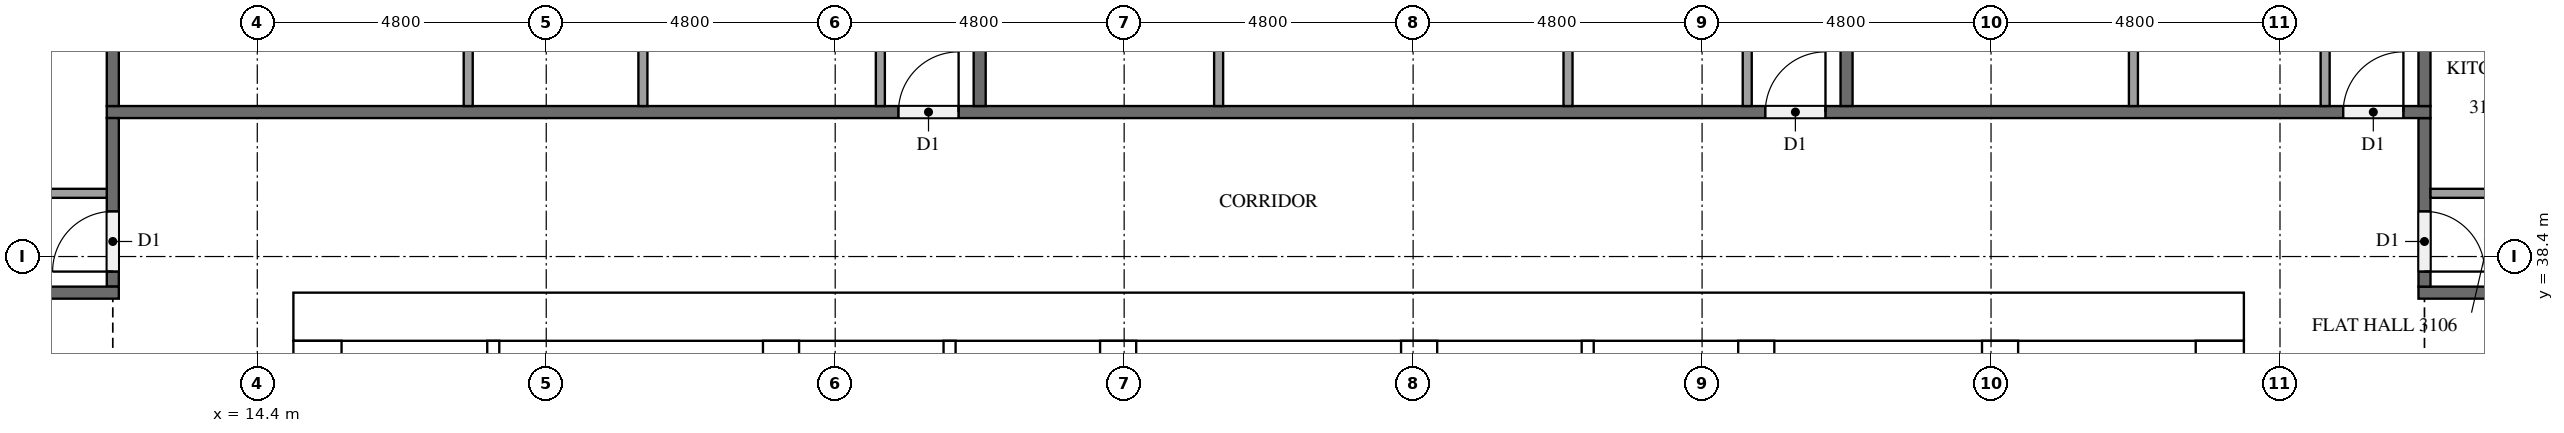
"""IFC4 building model, lengths in metres.
Left out: names, types, materials, properties, quantities, classifications, styles, units other than length and angle.
Written with IfcOpenShell. Run it as: python <this file> out.ifc"""

import sys

from ifc_helpers import new_model, si_unit, direction, frame, frame_2d, origin, place, context, subcontext, project, spatial, rectangle, extrude, element, fill, save


model = new_model("IFC4")
c1 = context("Model", 3, precision=1e-05, world=origin(), true_north=direction((0.0, 1.0)))
c2 = subcontext(c1, "Body", "Model", "MODEL_VIEW")
j1 = project(units=[si_unit("LENGTHUNIT", "METRE"), si_unit("PLANEANGLEUNIT", "RADIAN")], contexts=[c1])
p1 = place(None, origin())
s1 = spatial("IfcSite", under=j1, at=p1, CompositionType="ELEMENT")
p2 = place(p1, origin())
s2 = spatial("IfcBuilding", under=s1, at=p2, CompositionType="ELEMENT")
p3 = place(p2, frame((0.0, 0.0, 122.6)))
s3 = spatial("IfcBuildingStorey", under=s2, at=p3, CompositionType="ELEMENT", Elevation=122.6)
p4 = place(p3, frame((15.0, 37.4, 0.0), z_axis=(0.0, 0.0, 1.0), x_axis=(1.0, 0.0, 0.0)))
e1 = element("IfcWall", 1, at=p4, inside=s3, PredefinedType="SHEAR", context=c2, shape_type="SweptSolid", body=[
    extrude(rectangle(XDim=32.4, YDim=0.8, at=frame_2d((16.2, 0.0))), origin(), (0.0, 0.0, 1.0), 3.2),
])
p5 = place(p4, frame((15.3, 0.0, 0.0)))
e2 = element("IfcOpeningElement", 2, at=p5, cuts=e1, PredefinedType="OPENING", context=c2, shape_type="SweptSolid", body=[
    extrude(rectangle(XDim=1.8, YDim=2.1, at=frame_2d((0.9, 1.05))), frame((0.0, 0.41, 0.0), z_axis=(0.0, -1.0, 0.0), x_axis=(1.0, 0.0, 0.0)), (0.0, 0.0, 1.0), 0.82),
])
p6 = place(p4, frame((1.51, 0.0, 0.0)))
e3 = element("IfcOpeningElement", 3, at=p6, cuts=e1, PredefinedType="OPENING", context=c2, shape_type="SweptSolid", body=[
    extrude(rectangle(XDim=1.0, YDim=2.1, at=frame_2d((0.5, 1.05))), frame((0.0, 0.41, 0.0), z_axis=(0.0, -1.0, 0.0), x_axis=(1.0, 0.0, 0.0)), (0.0, 0.0, 1.0), 0.82),
])
p7 = place(p4, frame((5.11, 0.0, 0.0)))
e4 = element("IfcOpeningElement", 4, at=p7, cuts=e1, PredefinedType="OPENING", context=c2, shape_type="SweptSolid", body=[
    extrude(rectangle(XDim=1.0, YDim=2.1, at=frame_2d((0.5, 1.05))), frame((0.0, 0.41, 0.0), z_axis=(0.0, -1.0, 0.0), x_axis=(1.0, 0.0, 0.0)), (0.0, 0.0, 1.0), 0.82),
])
p8 = place(p3, frame((15.4, 15.8, 0.0), z_axis=(0.0, 0.0, 1.0), x_axis=(0.0, 1.0, 0.0)))
e5 = element("IfcWall", 5, at=p8, inside=s3, PredefinedType="SHEAR", context=c2, shape_type="SweptSolid", body=[
    extrude(rectangle(XDim=21.2, YDim=0.8, at=frame_2d((10.6, 0.0))), origin(), (0.0, 0.0, 1.0), 3.2),
])
p9 = place(p8, frame((4.96, 0.0, 0.0)))
e6 = element("IfcOpeningElement", 6, at=p9, cuts=e5, PredefinedType="OPENING", context=c2, shape_type="SweptSolid", body=[
    extrude(rectangle(XDim=1.2, YDim=2.1, at=frame_2d((0.6, 1.05))), frame((0.0, 0.41, 0.0), z_axis=(0.0, -1.0, 0.0), x_axis=(1.0, 0.0, 0.0)), (0.0, 0.0, 1.0), 0.82),
])
p10 = place(p3, frame((47.0, 15.8, 0.0), z_axis=(0.0, 0.0, 1.0), x_axis=(0.0, 1.0, 0.0)))
e7 = element("IfcWall", 7, at=p10, inside=s3, PredefinedType="SHEAR", context=c2, shape_type="SweptSolid", body=[
    extrude(rectangle(XDim=21.2, YDim=0.8, at=frame_2d((10.6, 0.0))), origin(), (0.0, 0.0, 1.0), 3.2),
])
p11 = place(p10, frame((10.3, 0.0, 0.0)))
e8 = element("IfcOpeningElement", 8, at=p11, cuts=e7, PredefinedType="OPENING", context=c2, shape_type="SweptSolid", body=[
    extrude(rectangle(XDim=1.2, YDim=2.1, at=frame_2d((0.6, 1.05))), frame((0.0, 0.41, 0.0), z_axis=(0.0, -1.0, 0.0), x_axis=(1.0, 0.0, 0.0)), (0.0, 0.0, 1.0), 0.82),
])
p12 = place(p3, frame((23.1, 15.8, 0.0), z_axis=(0.0, 0.0, 1.0), x_axis=(0.0, 1.0, 0.0)))
e9 = element("IfcWall", 9, at=p12, inside=s3, PredefinedType="SHEAR", context=c2, shape_type="SweptSolid", body=[
    extrude(rectangle(XDim=21.2, YDim=0.6, at=frame_2d((10.6, 0.0))), origin(), (0.0, 0.0, 1.0), 3.2),
])
p13 = place(p3, frame((39.3, 27.75, 0.0), z_axis=(0.0, 0.0, 1.0), x_axis=(0.0, 1.0, 0.0)))
e10 = element("IfcWall", 10, at=p13, inside=s3, PredefinedType="SHEAR", context=c2, shape_type="SweptSolid", body=[
    extrude(rectangle(XDim=9.25, YDim=0.6, at=frame_2d((4.625, 0.0))), origin(), (0.0, 0.0, 1.0), 3.2),
])
p14 = place(p3, frame((43.35, 27.75, 0.0), z_axis=(0.0, 0.0, 1.0), x_axis=(0.0, 1.0, 0.0)))
e11 = element("IfcWall", 11, at=p14, inside=s3, PredefinedType="SHEAR", context=c2, shape_type="SweptSolid", body=[
    extrude(rectangle(XDim=9.25, YDim=0.6, at=frame_2d((4.625, 0.0))), origin(), (0.0, 0.0, 1.0), 3.2),
])
p15 = place(p14, frame((7.65, 0.0, 0.0)))
e12 = element("IfcOpeningElement", 12, at=p15, cuts=e11, PredefinedType="OPENING", context=c2, shape_type="SweptSolid", body=[
    extrude(rectangle(XDim=1.2, YDim=2.1, at=frame_2d((0.6, 1.05))), frame((0.0, 0.31, 0.0), z_axis=(0.0, -1.0, 0.0), x_axis=(1.0, 0.0, 0.0)), (0.0, 0.0, 1.0), 0.62),
])
for number, where, z_axis, x_axis in (
    (13, (28.7, 33.85, 0.0), (0.0, 0.0, 1.0), (0.0, 1.0, 0.0)),
    (14, (33.7, 33.85, 0.0), (0.0, 0.0, 1.0), (0.0, 1.0, 0.0)),
):
    element("IfcWall", number, at=place(p3, frame(where, z_axis=z_axis, x_axis=x_axis)), inside=s3, PredefinedType="SHEAR", context=c2, shape_type="SweptSolid", body=[
        extrude(rectangle(XDim=3.15, YDim=0.6, at=frame_2d((1.575, 0.0))), origin(), (0.0, 0.0, 1.0), 3.2),
    ])
for number, where, z_axis, x_axis in (
    (15, (25.9, 33.85, 0.0), (0.0, 0.0, 1.0), (0.0, 1.0, 0.0)),
    (16, (36.5, 33.85, 0.0), (0.0, 0.0, 1.0), (0.0, 1.0, 0.0)),
):
    element("IfcWall", number, at=place(p3, frame(where, z_axis=z_axis, x_axis=x_axis)), inside=s3, PredefinedType="SOLIDWALL", context=c2, shape_type="SweptSolid", body=[
        extrude(rectangle(XDim=3.15, YDim=0.2, at=frame_2d((1.575, 0.0))), origin(), (0.0, 0.0, 1.0), 3.2),
    ])
p16 = place(p3, frame((18.32, 31.55, 0.0), z_axis=(0.0, 0.0, 1.0), x_axis=(0.0, 1.0, 0.0)))
e17 = element("IfcWall", 17, at=p16, inside=s3, PredefinedType="PARTITIONING", context=c2, shape_type="SweptSolid", body=[
    extrude(rectangle(XDim=5.45, YDim=0.2, at=frame_2d((2.725, 0.0))), origin(), (0.0, 0.0, 1.0), 3.2),
])
p17 = place(p3, frame((52.5, 37.8, 0.0), z_axis=(0.0, 0.0, 1.0), x_axis=(-1.0, 0.0, 0.0)))
e18 = element("IfcWall", 18, at=p17, inside=s3, PredefinedType="PARTITIONING", context=c2, shape_type="SweptSolid", body=[
    extrude(rectangle(XDim=2.2, YDim=0.2, at=frame_2d((1.1, 0.0))), origin(), (0.0, 0.0, 1.0), 3.2),
])
p18 = place(p3, frame((50.4, 40.7, 0.0), z_axis=(0.0, 0.0, 1.0), x_axis=(0.0, -1.0, 0.0)))
e19 = element("IfcWall", 19, at=p18, inside=s3, PredefinedType="PARTITIONING", context=c2, shape_type="SweptSolid", body=[
    extrude(rectangle(XDim=2.8, YDim=0.2, at=frame_2d((1.4, 0.0))), origin(), (0.0, 0.0, 1.0), 3.2),
])
p19 = place(p18, frame((1.55, 0.0, 0.0)))
e20 = element("IfcOpeningElement", 20, at=p19, cuts=e19, PredefinedType="OPENING", context=c2, shape_type="SweptSolid", body=[
    extrude(rectangle(XDim=1.0, YDim=2.1, at=frame_2d((0.5, 1.05))), frame((0.0, 0.11, 0.0), z_axis=(0.0, -1.0, 0.0), x_axis=(1.0, 0.0, 0.0)), (0.0, 0.0, 1.0), 0.22),
])
p20 = place(p3, frame((11.9, 40.8, 0.0), z_axis=(0.0, 0.0, 1.0), x_axis=(1.0, 0.0, 0.0)))
e21 = element("IfcWall", 21, at=p20, inside=s3, PredefinedType="PARTITIONING", context=c2, shape_type="SweptSolid", body=[
    extrude(rectangle(XDim=38.6, YDim=0.2, at=frame_2d((19.3, 0.0))), origin(), (0.0, 0.0, 1.0), 3.2),
])
p21 = place(p20, frame((37.15, 0.0, 0.0)))
e22 = element("IfcOpeningElement", 22, at=p21, cuts=e21, PredefinedType="OPENING", context=c2, shape_type="SweptSolid", body=[
    extrude(rectangle(XDim=1.0, YDim=2.1, at=frame_2d((0.5, 1.05))), frame((0.0, 0.11, 0.0), z_axis=(0.0, -1.0, 0.0), x_axis=(1.0, 0.0, 0.0)), (0.0, 0.0, 1.0), 0.22),
])
p22 = place(p20, frame((27.55, 0.0, 0.0)))
e23 = element("IfcOpeningElement", 23, at=p22, cuts=e21, PredefinedType="OPENING", context=c2, shape_type="SweptSolid", body=[
    extrude(rectangle(XDim=1.0, YDim=2.1, at=frame_2d((0.5, 1.05))), frame((0.0, 0.11, 0.0), z_axis=(0.0, -1.0, 0.0), x_axis=(1.0, 0.0, 0.0)), (0.0, 0.0, 1.0), 0.22),
])
p23 = place(p20, frame((13.15, 0.0, 0.0)))
e24 = element("IfcOpeningElement", 24, at=p23, cuts=e21, PredefinedType="OPENING", context=c2, shape_type="SweptSolid", body=[
    extrude(rectangle(XDim=1.0, YDim=2.1, at=frame_2d((0.5, 1.05))), frame((0.0, 0.11, 0.0), z_axis=(0.0, -1.0, 0.0), x_axis=(1.0, 0.0, 0.0)), (0.0, 0.0, 1.0), 0.22),
])
p24 = place(p3, frame((12.0, 37.9, 0.0), z_axis=(0.0, 0.0, 1.0), x_axis=(0.0, 1.0, 0.0)))
e25 = element("IfcWall", 25, at=p24, inside=s3, PredefinedType="PARTITIONING", context=c2, shape_type="SweptSolid", body=[
    extrude(rectangle(XDim=2.8, YDim=0.2, at=frame_2d((1.4, 0.0))), origin(), (0.0, 0.0, 1.0), 3.2),
])
p25 = place(p24, frame((0.25, 0.0, 0.0)))
e26 = element("IfcOpeningElement", 26, at=p25, cuts=e25, PredefinedType="OPENING", context=c2, shape_type="SweptSolid", body=[
    extrude(rectangle(XDim=1.0, YDim=2.1, at=frame_2d((0.5, 1.05))), frame((0.0, 0.11, 0.0), z_axis=(0.0, -1.0, 0.0), x_axis=(1.0, 0.0, 0.0)), (0.0, 0.0, 1.0), 0.22),
])
p26 = place(p3, frame((12.1, 37.8, 0.0), z_axis=(0.0, 0.0, 1.0), x_axis=(-1.0, 0.0, 0.0)))
e27 = element("IfcWall", 27, at=p26, inside=s3, PredefinedType="PARTITIONING", context=c2, shape_type="SweptSolid", body=[
    extrude(rectangle(XDim=2.2, YDim=0.2, at=frame_2d((1.1, 0.0))), origin(), (0.0, 0.0, 1.0), 3.2),
])
for number, where, z_axis, x_axis in (
    (28, (50.4, 40.9, 0.0), (0.0, 0.0, 1.0), (0.0, 1.0, 0.0)),
    (29, (40.8, 52.7, 0.0), (0.0, 0.0, 1.0), (0.0, -1.0, 0.0)),
    (30, (26.4, 52.7, 0.0), (0.0, 0.0, 1.0), (0.0, -1.0, 0.0)),
    (31, (12.0, 52.7, 0.0), (0.0, 0.0, 1.0), (0.0, -1.0, 0.0)),
):
    element("IfcWall", number, at=place(p3, frame(where, z_axis=z_axis, x_axis=x_axis)), inside=s3, PredefinedType="PARTITIONING", context=c2, shape_type="SweptSolid", body=[
        extrude(rectangle(XDim=11.8, YDim=0.2, at=frame_2d((5.9, 0.0))), origin(), (0.0, 0.0, 1.0), 3.2),
    ])
p27 = place(p3, frame((50.5, 39.45, 0.0), z_axis=(0.0, 0.0, 1.0), x_axis=(1.0, 0.0, 0.0)))
e32 = element("IfcWall", 32, at=p27, inside=s3, PredefinedType="PARTITIONING", context=c2, shape_type="SweptSolid", body=[
    extrude(rectangle(XDim=2.075, YDim=0.15, at=frame_2d((1.038, 0.0))), origin(), (0.0, 0.0, 1.0), 3.2),
])
p28 = place(p3, frame((45.565, 40.9, 0.0), z_axis=(0.0, 0.0, 1.0), x_axis=(0.0, 1.0, 0.0)))
e33 = element("IfcWall", 33, at=p28, inside=s3, PredefinedType="PARTITIONING", context=c2, shape_type="SweptSolid", body=[
    extrude(rectangle(XDim=3.725, YDim=0.15, at=frame_2d((1.863, 0.0))), origin(), (0.0, 0.0, 1.0), 3.2),
])
for number, where, z_axis, x_axis in (
    (34, (48.75, 40.9, 0.0), (0.0, 0.0, 1.0), (0.0, 1.0, 0.0)),
    (35, (36.173, 40.9, 0.0), (0.0, 0.0, 1.0), (0.0, 1.0, 0.0)),
    (36, (30.369, 40.9, 0.0), (0.0, 0.0, 1.0), (0.0, 1.0, 0.0)),
):
    element("IfcWall", number, at=place(p3, frame(where, z_axis=z_axis, x_axis=x_axis)), inside=s3, PredefinedType="PARTITIONING", context=c2, shape_type="SweptSolid", body=[
        extrude(rectangle(XDim=3.875, YDim=0.15, at=frame_2d((1.938, 0.0))), origin(), (0.0, 0.0, 1.0), 3.2),
    ])
p29 = place(p3, frame((39.15, 40.9, 0.0), z_axis=(0.0, 0.0, 1.0), x_axis=(0.0, 1.0, 0.0)))
e37 = element("IfcWall", 37, at=p29, inside=s3, PredefinedType="PARTITIONING", context=c2, shape_type="SweptSolid", body=[
    extrude(rectangle(XDim=4.025, YDim=0.15, at=frame_2d((2.013, 0.0))), origin(), (0.0, 0.0, 1.0), 3.2),
])
for number, where, z_axis, x_axis in (
    (38, (20.806, 40.9, 0.0), (0.0, 0.0, 1.0), (0.0, 1.0, 0.0)),
    (39, (17.904, 40.9, 0.0), (0.0, 0.0, 1.0), (0.0, 1.0, 0.0)),
):
    element("IfcWall", number, at=place(p3, frame(where, z_axis=z_axis, x_axis=x_axis)), inside=s3, PredefinedType="PARTITIONING", context=c2, shape_type="SweptSolid", body=[
        extrude(rectangle(XDim=4.475, YDim=0.15, at=frame_2d((2.238, 0.0))), origin(), (0.0, 0.0, 1.0), 3.2),
    ])
p30 = place(p3, frame((24.75, 40.9, 0.0), z_axis=(0.0, 0.0, 1.0), x_axis=(0.0, 1.0, 0.0)))
e40 = element("IfcWall", 40, at=p30, inside=s3, PredefinedType="PARTITIONING", context=c2, shape_type="SweptSolid", body=[
    extrude(rectangle(XDim=4.625, YDim=0.15, at=frame_2d((2.312, 0.0))), origin(), (0.0, 0.0, 1.0), 3.2),
])
p31 = place(p3, frame((11.9, 39.45, 0.0), z_axis=(0.0, 0.0, 1.0), x_axis=(-1.0, 0.0, 0.0)))
e41 = element("IfcWall", 41, at=p31, inside=s3, PredefinedType="PARTITIONING", context=c2, shape_type="SweptSolid", body=[
    extrude(rectangle(XDim=4.325, YDim=0.15, at=frame_2d((2.163, 0.0))), origin(), (0.0, 0.0, 1.0), 3.2),
])
p32 = place(p5, origin())
e42 = element("IfcDoor", 42, at=p32, inside=s3, OperationType="DOUBLE_DOOR_SINGLE_SWING", PredefinedType="DOOR", context=c2, shape_type="SweptSolid", body=[
    extrude(rectangle(XDim=1.8, YDim=2.1, at=frame_2d((0.9, 1.05))), frame((0.0, 0.025, 0.0), z_axis=(0.0, -1.0, 0.0), x_axis=(1.0, 0.0, 0.0)), (0.0, 0.0, 1.0), 0.05),
])
fill(e2, e42)
p33 = place(p6, origin())
e43 = element("IfcDoor", 43, at=p33, inside=s3, OperationType="SINGLE_SWING_RIGHT", PredefinedType="DOOR", context=c2, shape_type="SweptSolid", body=[
    extrude(rectangle(XDim=1.0, YDim=2.1, at=frame_2d((0.5, 1.05))), frame((0.0, 0.025, 0.0), z_axis=(0.0, -1.0, 0.0), x_axis=(1.0, 0.0, 0.0)), (0.0, 0.0, 1.0), 0.05),
])
fill(e3, e43)
p34 = place(p7, origin())
e44 = element("IfcDoor", 44, at=p34, inside=s3, OperationType="SINGLE_SWING_LEFT", PredefinedType="DOOR", context=c2, shape_type="SweptSolid", body=[
    extrude(rectangle(XDim=1.0, YDim=2.1, at=frame_2d((0.5, 1.05))), frame((0.0, 0.025, 0.0), z_axis=(0.0, -1.0, 0.0), x_axis=(1.0, 0.0, 0.0)), (0.0, 0.0, 1.0), 0.05),
])
fill(e4, e44)
p35 = place(p19, origin())
e45 = element("IfcDoor", 45, at=p35, inside=s3, OperationType="SINGLE_SWING_RIGHT", PredefinedType="DOOR", context=c2, shape_type="SweptSolid", body=[
    extrude(rectangle(XDim=1.0, YDim=2.1, at=frame_2d((0.5, 1.05))), frame((0.0, 0.025, 0.0), z_axis=(0.0, -1.0, 0.0), x_axis=(1.0, 0.0, 0.0)), (0.0, 0.0, 1.0), 0.05),
])
fill(e20, e45)
p36 = place(p21, origin())
e46 = element("IfcDoor", 46, at=p36, inside=s3, OperationType="SINGLE_SWING_RIGHT", PredefinedType="DOOR", context=c2, shape_type="SweptSolid", body=[
    extrude(rectangle(XDim=1.0, YDim=2.1, at=frame_2d((0.5, 1.05))), frame((0.0, 0.025, 0.0), z_axis=(0.0, -1.0, 0.0), x_axis=(1.0, 0.0, 0.0)), (0.0, 0.0, 1.0), 0.05),
])
fill(e22, e46)
p37 = place(p22, origin())
e47 = element("IfcDoor", 47, at=p37, inside=s3, OperationType="SINGLE_SWING_RIGHT", PredefinedType="DOOR", context=c2, shape_type="SweptSolid", body=[
    extrude(rectangle(XDim=1.0, YDim=2.1, at=frame_2d((0.5, 1.05))), frame((0.0, 0.025, 0.0), z_axis=(0.0, -1.0, 0.0), x_axis=(1.0, 0.0, 0.0)), (0.0, 0.0, 1.0), 0.05),
])
fill(e23, e47)
p38 = place(p23, origin())
e48 = element("IfcDoor", 48, at=p38, inside=s3, OperationType="SINGLE_SWING_RIGHT", PredefinedType="DOOR", context=c2, shape_type="SweptSolid", body=[
    extrude(rectangle(XDim=1.0, YDim=2.1, at=frame_2d((0.5, 1.05))), frame((0.0, 0.025, 0.0), z_axis=(0.0, -1.0, 0.0), x_axis=(1.0, 0.0, 0.0)), (0.0, 0.0, 1.0), 0.05),
])
fill(e24, e48)
p39 = place(p25, origin())
e49 = element("IfcDoor", 49, at=p39, inside=s3, OperationType="SINGLE_SWING_LEFT", PredefinedType="DOOR", context=c2, shape_type="SweptSolid", body=[
    extrude(rectangle(XDim=1.0, YDim=2.1, at=frame_2d((0.5, 1.05))), frame((0.0, 0.025, 0.0), z_axis=(0.0, -1.0, 0.0), x_axis=(1.0, 0.0, 0.0)), (0.0, 0.0, 1.0), 0.05),
])
fill(e26, e49)
save(model, sys.argv[1])
